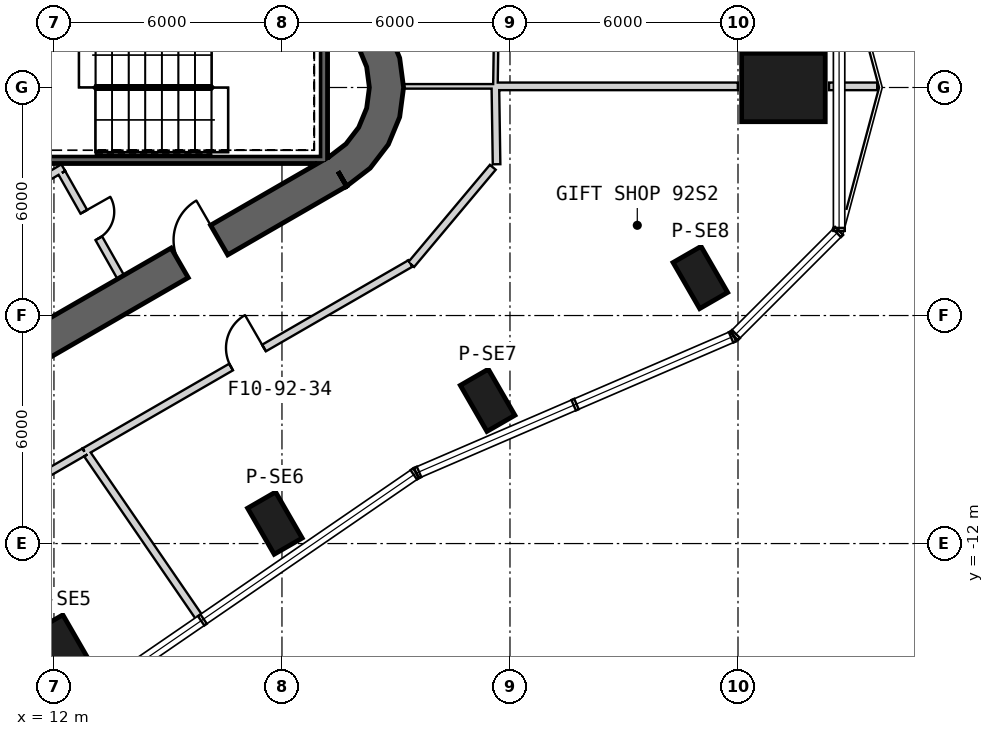
"""IFC4 building model, lengths in metres.
Left out: names, types, materials, properties, quantities, classifications, styles, units other than length and angle.
Written with IfcOpenShell. Run it as: python <this file> out.ifc"""

import sys

from ifc_helpers import new_model, si_unit, direction, frame, frame_2d, origin, origin_2d, place, context, subcontext, project, spatial, polyline, rectangle, outline, extrude, element, fill, save


model = new_model("IFC4")
c1 = context("Model", 3, precision=1e-05, world=origin(), true_north=direction((0.0, 1.0)))
c2 = subcontext(c1, "Body", "Model", "MODEL_VIEW")
j1 = project(units=[si_unit("LENGTHUNIT", "METRE"), si_unit("PLANEANGLEUNIT", "RADIAN")], contexts=[c1])
p1 = place(None, origin())
s1 = spatial("IfcSite", under=j1, at=p1, CompositionType="ELEMENT")
p2 = place(p1, origin())
s2 = spatial("IfcBuilding", under=s1, at=p2, CompositionType="ELEMENT")
p3 = place(p2, frame((0.0, 0.0, 404.8)))
s3 = spatial("IfcBuildingStorey", under=s2, at=p3, CompositionType="ELEMENT", Elevation=404.8)
p4 = place(p3, frame((31.196, 0.0, 0.0), z_axis=(0.0, 0.0, 1.0), x_axis=(1.0, 0.0, 0.0)))
e1 = element("IfcColumn", 1, at=p4, inside=s3, PredefinedType="COLUMN", context=c2, shape_type="SweptSolid", body=[
    extrude(rectangle(XDim=2.2, YDim=1.8, at=origin_2d()), origin(), (0.0, 0.0, 1.0), 5.25),
])
for number, where, z_axis, x_axis in (
    (2, (12.216, -14.695, 0.0), (0.0, 0.0, 1.0), (0.5, -0.866, 0.0)),
    (3, (17.814, -11.463, 0.0), (0.0, 0.0, 1.0), (0.5, -0.866, 0.0)),
    (4, (23.412, -8.231, 0.0), (0.0, 0.0, 1.0), (0.5, -0.866, 0.0)),
    (5, (29.01, -4.999, 0.0), (0.0, 0.0, 1.0), (0.5, -0.866, 0.0)),
):
    element("IfcColumn", number, at=place(p3, frame(where, z_axis=z_axis, x_axis=x_axis)), inside=s3, PredefinedType="COLUMN", context=c2, shape_type="SweptSolid", body=[
        extrude(rectangle(XDim=1.4, YDim=0.85, at=origin_2d()), origin(), (0.0, 0.0, 1.0), 5.25),
    ])
p5 = place(p3, frame((-7.825, -17.97, 0.0), z_axis=(0.0, 0.0, 1.0), x_axis=(0.866028369851, 0.499994862586, 0.0)))
e6 = element("IfcWall", 6, at=p5, inside=s3, PredefinedType="SHEAR", context=c2, shape_type="SweptSolid", body=[
    extrude(rectangle(XDim=31.523, YDim=0.9, at=frame_2d((15.762, 0.0))), origin(), (0.0, 0.0, 1.0), 5.5),
])
p6 = place(p5, frame((7.062, 0.0, 0.0)))
e7 = element("IfcOpeningElement", 7, at=p6, cuts=e6, PredefinedType="OPENING", context=c2, shape_type="SweptSolid", body=[
    extrude(rectangle(XDim=1.2, YDim=2.4, at=frame_2d((0.6, 1.2))), frame((0.0, 0.46, 0.0), z_axis=(0.0, -1.0, 0.0), x_axis=(1.0, 0.0, 0.0)), (0.0, 0.0, 1.0), 0.92),
])
p7 = place(p5, frame((9.762, 0.0, 0.0)))
e8 = element("IfcOpeningElement", 8, at=p7, cuts=e6, PredefinedType="OPENING", context=c2, shape_type="SweptSolid", body=[
    extrude(rectangle(XDim=1.2, YDim=2.4, at=frame_2d((0.6, 1.2))), frame((0.0, 0.46, 0.0), z_axis=(0.0, -1.0, 0.0), x_axis=(1.0, 0.0, 0.0)), (0.0, 0.0, 1.0), 0.92),
])
p8 = place(p5, frame((17.862, 0.0, 0.0)))
e9 = element("IfcOpeningElement", 9, at=p8, cuts=e6, PredefinedType="OPENING", context=c2, shape_type="SweptSolid", body=[
    extrude(rectangle(XDim=1.2, YDim=2.4, at=frame_2d((0.6, 1.2))), frame((0.0, 0.46, 0.0), z_axis=(0.0, -1.0, 0.0), x_axis=(1.0, 0.0, 0.0)), (0.0, 0.0, 1.0), 0.92),
])
p9 = place(p5, frame((20.562, 0.0, 0.0)))
e10 = element("IfcOpeningElement", 10, at=p9, cuts=e6, PredefinedType="OPENING", context=c2, shape_type="SweptSolid", body=[
    extrude(rectangle(XDim=1.2, YDim=2.4, at=frame_2d((0.6, 1.2))), frame((0.0, 0.46, 0.0), z_axis=(0.0, -1.0, 0.0), x_axis=(1.0, 0.0, 0.0)), (0.0, 0.0, 1.0), 0.92),
])
p10 = place(p5, frame((26.712, 0.0, 0.0)))
e11 = element("IfcOpeningElement", 11, at=p10, cuts=e6, PredefinedType="OPENING", context=c2, shape_type="SweptSolid", body=[
    extrude(rectangle(XDim=1.2, YDim=2.4, at=frame_2d((0.6, 1.2))), frame((0.0, 0.46, 0.0), z_axis=(0.0, -1.0, 0.0), x_axis=(1.0, 0.0, 0.0)), (0.0, 0.0, 1.0), 0.92),
])
p11 = place(p5, frame((3.612, 0.0, 0.0)))
e12 = element("IfcOpeningElement", 12, at=p11, cuts=e6, PredefinedType="OPENING", context=c2, shape_type="SweptSolid", body=[
    extrude(rectangle(XDim=1.2, YDim=2.4, at=frame_2d((0.6, 1.2))), frame((0.0, 0.46, 0.0), z_axis=(0.0, -1.0, 0.0), x_axis=(1.0, 0.0, 0.0)), (0.0, 0.0, 1.0), 0.92),
])
p12 = place(p3, origin())
e13 = element("IfcWall", 13, at=p12, inside=s3, PredefinedType="SHEAR", context=c2, shape_type="SweptSolid", body=[
    extrude(outline(polyline([(19.7, -2.598), (20.321, -2.121), (20.798, -1.5), (21.098, -0.777), (21.2, 0.0), (21.098, 0.777), (20.798, 1.5), (20.321, 2.121), (19.7, 2.598), (19.25, 1.819), (19.685, 1.485), (20.019, 1.05), (20.229, 0.543), (20.3, 0.0), (20.229, -0.543), (20.019, -1.05), (19.685, -1.485), (19.25, -1.819), (19.7, -2.598)])), origin(), (0.0, 0.0, 1.0), 5.5),
])
p13 = place(p3, frame((19.1, -2.0, -0.3), z_axis=(0.0, 0.0, 1.0), x_axis=(0.0, 1.0, 0.0)))
e14 = element("IfcWall", 14, at=p13, inside=s3, PredefinedType="SHEAR", context=c2, shape_type="SweptSolid", body=[
    extrude(rectangle(XDim=3.8, YDim=0.2, at=frame_2d((1.9, 0.0))), origin(), (0.0, 0.0, 1.0), 5.55),
])
p14 = place(p3, frame((11.1, -1.9, -0.3), z_axis=(0.0, 0.0, 1.0), x_axis=(1.0, 0.0, 0.0)))
e15 = element("IfcWall", 15, at=p14, inside=s3, PredefinedType="SHEAR", context=c2, shape_type="SweptSolid", body=[
    extrude(rectangle(XDim=7.9, YDim=0.2, at=frame_2d((3.95, 0.0))), origin(), (0.0, 0.0, 1.0), 5.55),
])
p15 = place(p3, frame((12.245, -2.109, 0.0), z_axis=(0.0, 0.0, 1.0), x_axis=(-0.860414880418, -0.509594185166, 0.0)))
e16 = element("IfcWall", 16, at=p15, inside=s3, PredefinedType="PARTITIONING", context=c2, shape_type="SweptSolid", body=[
    extrude(rectangle(XDim=2.7, YDim=0.2, at=frame_2d((1.35, 0.0))), origin(), (0.0, 0.0, 1.0), 5.25),
])
p16 = place(p3, frame((13.758, -4.99, 0.0), z_axis=(0.0, 0.0, 1.0), x_axis=(-0.491993409184, 0.87059892334, 0.0)))
e17 = element("IfcWall", 17, at=p16, inside=s3, PredefinedType="PARTITIONING", context=c2, shape_type="SweptSolid", body=[
    extrude(rectangle(XDim=3.15, YDim=0.2, at=frame_2d((1.575, 0.0))), origin(), (0.0, 0.0, 1.0), 5.25),
])
p17 = place(p16, frame((1.175, 0.0, 0.0)))
e18 = element("IfcOpeningElement", 18, at=p17, cuts=e17, PredefinedType="OPENING", context=c2, shape_type="SweptSolid", body=[
    extrude(rectangle(XDim=0.8, YDim=2.1, at=frame_2d((0.4, 1.05))), frame((0.0, 0.11, 0.0), z_axis=(0.0, -1.0, 0.0), x_axis=(1.0, 0.0, 0.0)), (0.0, 0.0, 1.0), 0.22),
])
p18 = place(p3, frame((23.616, 0.0, 0.0), z_axis=(0.0, 0.0, 1.0), x_axis=(0.015106746995, 0.999885886587, 0.0)))
e19 = element("IfcWall", 19, at=p18, inside=s3, PredefinedType="PARTITIONING", context=c2, shape_type="SweptSolid", body=[
    extrude(rectangle(XDim=1.891, YDim=0.12, at=frame_2d((0.945, 0.0))), origin(), (0.0, 0.0, 1.0), 3.02),
])
p19 = place(p3, frame((23.646, 0.03, 0.0), z_axis=(0.0, 0.0, 1.0), x_axis=(-1.0, 0.0, 0.0)))
e20 = element("IfcWall", 20, at=p19, inside=s3, PredefinedType="PARTITIONING", context=c2, shape_type="SweptSolid", body=[
    extrude(rectangle(XDim=2.6, YDim=0.12, at=frame_2d((1.3, 0.0))), origin(), (0.0, 0.0, 1.0), 3.02),
])
p20 = place(p3, frame((23.646, 0.03, 0.0), z_axis=(0.0, 0.0, 1.0), x_axis=(1.0, 0.0, 0.0)))
e21 = element("IfcWall", 21, at=p20, inside=s3, PredefinedType="PARTITIONING", context=c2, shape_type="SweptSolid", body=[
    extrude(rectangle(XDim=6.349, YDim=0.2, at=frame_2d((3.175, 0.0))), origin(), (0.0, 0.0, 1.0), 3.02),
])
p21 = place(p3, frame((32.396, 0.03, 0.0), z_axis=(0.0, 0.0, 1.0), x_axis=(1.0, 0.0, 0.0)))
e22 = element("IfcWall", 22, at=p21, inside=s3, PredefinedType="PARTITIONING", context=c2, shape_type="SweptSolid", body=[
    extrude(rectangle(XDim=1.268, YDim=0.2, at=frame_2d((0.634, 0.0))), origin(), (0.0, 0.0, 1.0), 5.25),
])
p22 = place(p3, frame((1.009, -16.391, 0.0), z_axis=(0.0, 0.0, 1.0), x_axis=(0.866026744585, 0.499997677658, 0.0)))
e23 = element("IfcWall", 23, at=p22, inside=s3, PredefinedType="PARTITIONING", context=c2, shape_type="SweptSolid", body=[
    extrude(rectangle(XDim=13.617, YDim=0.2, at=frame_2d((6.808, 0.0))), origin(), (0.0, 0.0, 1.0), 5.25),
])
p23 = place(p22, frame((6.456, 0.0, 0.0)))
e24 = element("IfcOpeningElement", 24, at=p23, cuts=e23, PredefinedType="OPENING", context=c2, shape_type="SweptSolid", body=[
    extrude(rectangle(XDim=1.0, YDim=2.1, at=frame_2d((0.5, 1.05))), frame((0.0, 0.11, 0.0), z_axis=(0.0, -1.0, 0.0), x_axis=(1.0, 0.0, 0.0)), (0.0, 0.0, 1.0), 0.22),
])
p24 = place(p3, frame((12.802, -9.583, 0.0), z_axis=(0.0, 0.0, 1.0), x_axis=(0.866025905529, 0.499999130952, 0.0)))
e25 = element("IfcWall", 25, at=p24, inside=s3, PredefinedType="PARTITIONING", context=c2, shape_type="SweptSolid", body=[
    extrude(rectangle(XDim=9.904, YDim=0.2, at=frame_2d((4.952, 0.0))), origin(), (0.0, 0.0, 1.0), 5.25),
])
p25 = place(p24, frame((4.456, 0.0, 0.0)))
e26 = element("IfcOpeningElement", 26, at=p25, cuts=e25, PredefinedType="OPENING", context=c2, shape_type="SweptSolid", body=[
    extrude(rectangle(XDim=1.0, YDim=2.1, at=frame_2d((0.5, 1.05))), frame((0.0, 0.11, 0.0), z_axis=(0.0, -1.0, 0.0), x_axis=(1.0, 0.0, 0.0)), (0.0, 0.0, 1.0), 0.22),
])
p26 = place(p3, frame((23.647, -2.02, 0.0), z_axis=(0.0, 0.0, 1.0), x_axis=(-0.015109493549, 0.999885845087, 0.0)))
e27 = element("IfcWall", 27, at=p26, inside=s3, PredefinedType="PARTITIONING", context=c2, shape_type="SweptSolid", body=[
    extrude(rectangle(XDim=2.02, YDim=0.2, at=frame_2d((1.01, 0.0))), origin(), (0.0, 0.0, 1.0), 3.02),
])
p27 = place(p3, frame((21.401, -4.657, 0.0), z_axis=(0.0, 0.0, 1.0), x_axis=(0.642826822895, 0.76601153762, 0.0)))
e28 = element("IfcWall", 28, at=p27, inside=s3, PredefinedType="PARTITIONING", context=c2, shape_type="SweptSolid", body=[
    extrude(rectangle(XDim=3.34, YDim=0.2, at=frame_2d((1.67, 0.0))), origin(), (0.0, 0.0, 1.0), 5.25),
])
p28 = place(p3, frame((12.879, -9.654, 0.0), z_axis=(0.0, 0.0, 1.0), x_axis=(0.565899563161, -0.824474186627, 0.0)))
e29 = element("IfcWall", 29, at=p28, inside=s3, PredefinedType="PARTITIONING", context=c2, shape_type="SweptSolid", body=[
    extrude(rectangle(XDim=5.303, YDim=0.2, at=frame_2d((2.652, 0.0))), origin(), (0.0, 0.0, 1.0), 5.25),
])
p29 = place(p17, origin())
e30 = element("IfcDoor", 30, at=p29, inside=s3, OperationType="SINGLE_SWING_RIGHT", PredefinedType="USERDEFINED", context=c2, shape_type="SweptSolid", body=[
    extrude(rectangle(XDim=0.8, YDim=2.1, at=frame_2d((0.4, 1.05))), frame((0.0, 0.025, 0.0), z_axis=(0.0, -1.0, 0.0), x_axis=(1.0, 0.0, 0.0)), (0.0, 0.0, 1.0), 0.05),
])
fill(e18, e30)
p30 = place(p25, origin())
e31 = element("IfcDoor", 31, at=p30, inside=s3, OperationType="SINGLE_SWING_RIGHT", PredefinedType="USERDEFINED", context=c2, shape_type="SweptSolid", body=[
    extrude(rectangle(XDim=1.0, YDim=2.1, at=frame_2d((0.5, 1.05))), frame((0.0, 0.025, 0.0), z_axis=(0.0, -1.0, 0.0), x_axis=(1.0, 0.0, 0.0)), (0.0, 0.0, 1.0), 0.05),
])
fill(e26, e31)
p31 = place(p10, origin())
e32 = element("IfcDoor", 32, at=p31, inside=s3, OperationType="SINGLE_SWING_RIGHT", PredefinedType="USERDEFINED", context=c2, shape_type="SweptSolid", body=[
    extrude(rectangle(XDim=1.2, YDim=2.4, at=frame_2d((0.6, 1.2))), frame((0.0, 0.025, 0.0), z_axis=(0.0, -1.0, 0.0), x_axis=(1.0, 0.0, 0.0)), (0.0, 0.0, 1.0), 0.05),
])
fill(e11, e32)
save(model, sys.argv[1])
